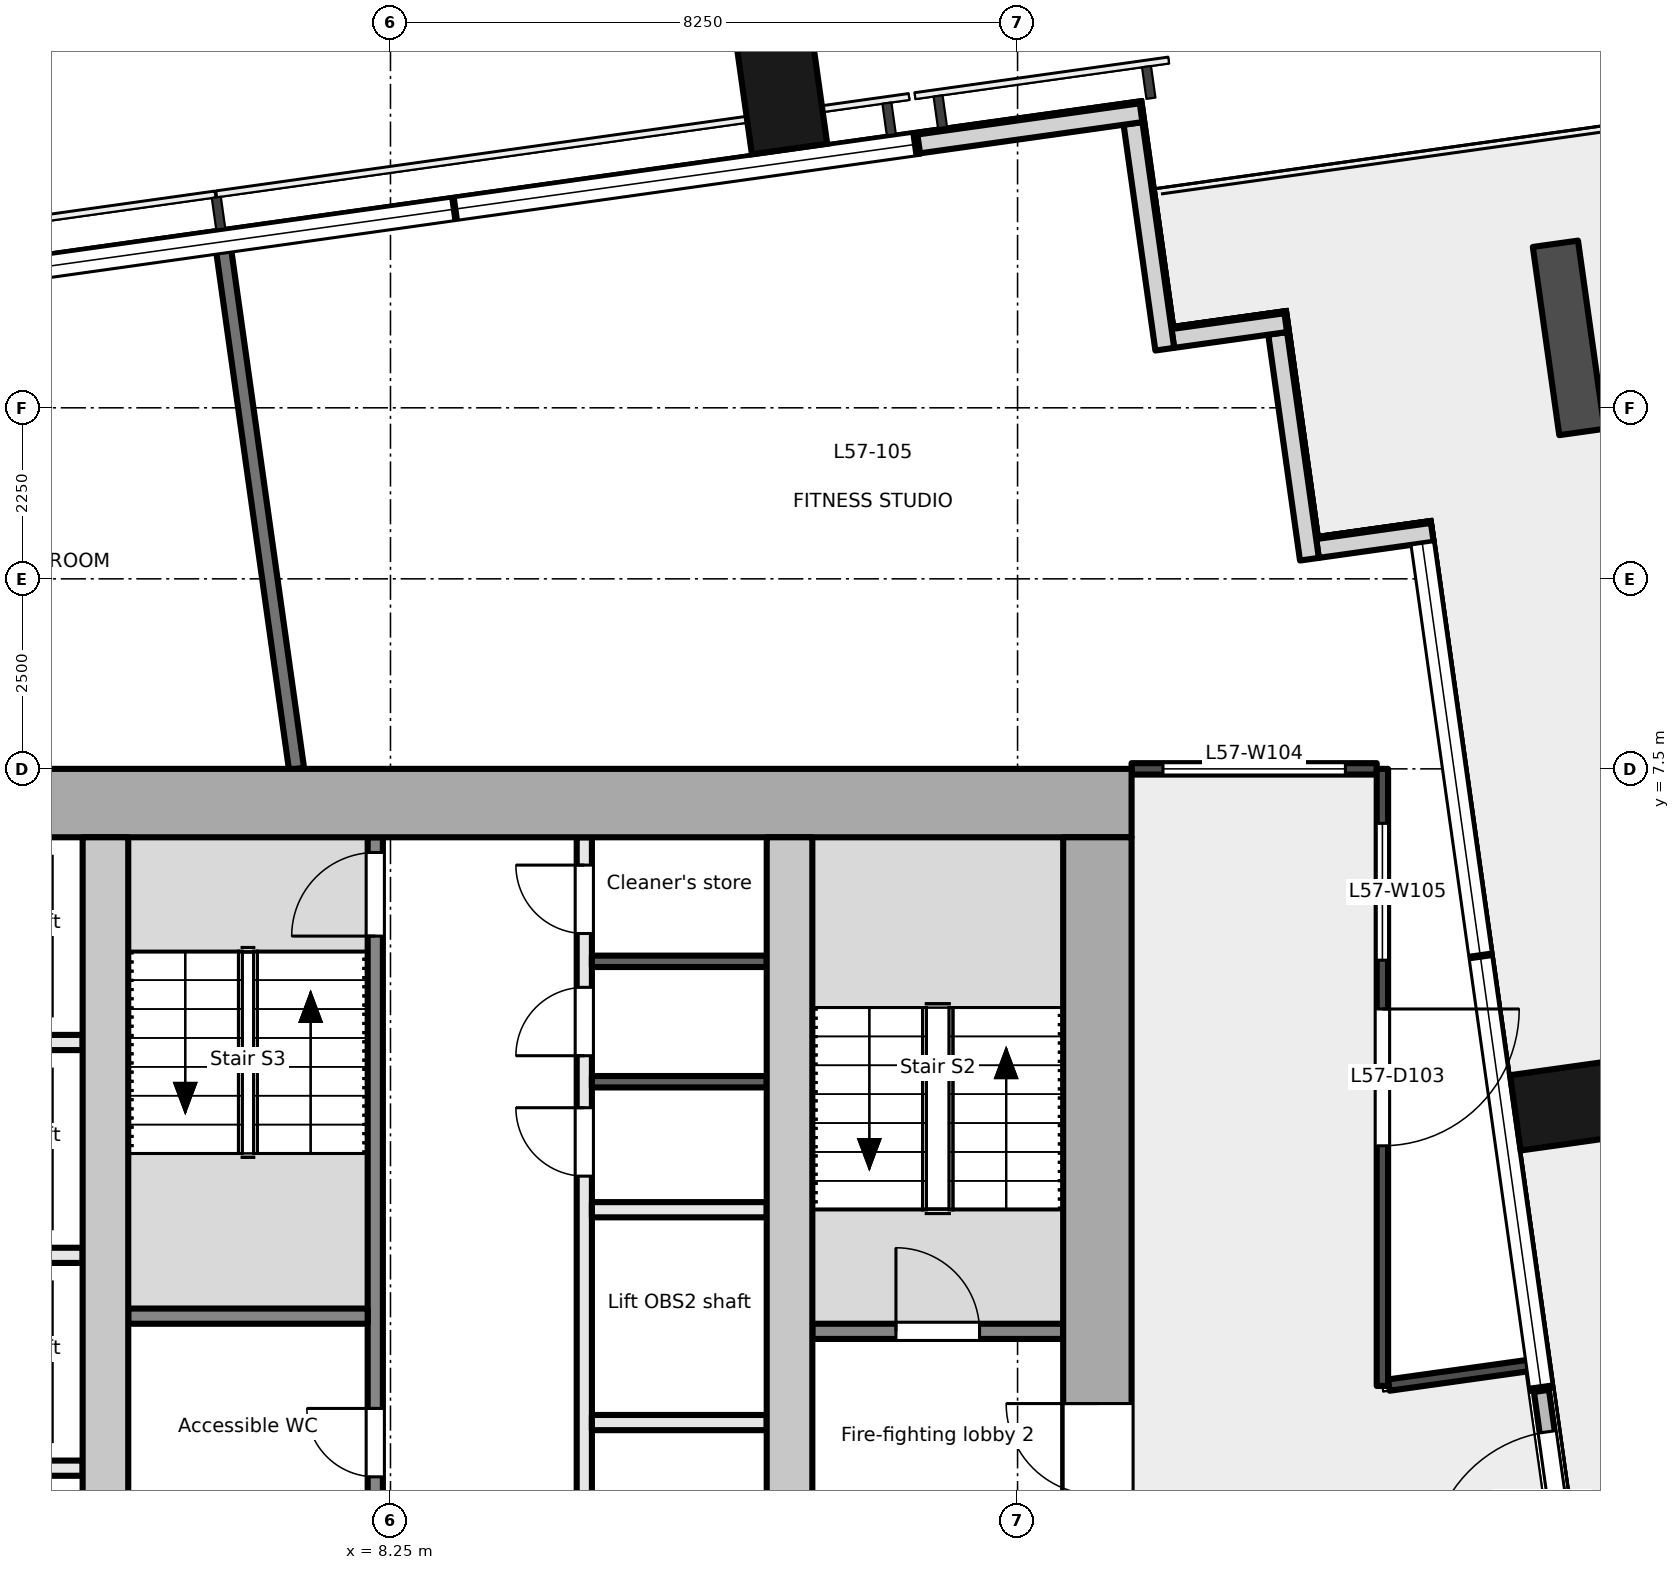
"""IFC4 building model, lengths in metres.
Left out: names, types, materials, properties, quantities, classifications, styles, units other than length and angle.
Written with IfcOpenShell. Run it as: python <this file> out.ifc"""

import sys

from ifc_helpers import new_model, si_unit, direction, frame, frame_2d, origin, origin_2d, place, context, subcontext, project, spatial, rectangle, extrude, element, fill, save


model = new_model("IFC4")
c1 = context("Model", 3, precision=1e-05, world=origin(), true_north=direction((0.0, 1.0)))
c2 = subcontext(c1, "Body", "Model", "MODEL_VIEW")
j1 = project(units=[si_unit("LENGTHUNIT", "METRE"), si_unit("PLANEANGLEUNIT", "RADIAN")], contexts=[c1])
p1 = place(None, origin())
s1 = spatial("IfcSite", under=j1, at=p1, CompositionType="ELEMENT")
p2 = place(p1, origin())
s2 = spatial("IfcBuilding", under=s1, at=p2, CompositionType="ELEMENT")
p3 = place(p2, frame((0.0, 0.0, 249.7)))
s3 = spatial("IfcBuildingStorey", under=s2, at=p3, CompositionType="ELEMENT", Elevation=249.7)
for number, where, z_axis, x_axis in (
    (1, (23.941, 3.1, -0.2), (0.0, 0.0, 1.0), (-0.139, 0.99, 0.0)),
    (2, (13.375, 16.546, -0.2), (0.0, 0.0, 1.0), (0.99, 0.139, 0.0)),
):
    element("IfcColumn", number, at=place(p3, frame(where, z_axis=z_axis, x_axis=x_axis)), inside=s3, PredefinedType="COLUMN", context=c2, shape_type="SweptSolid", body=[
        extrude(rectangle(XDim=1.0, YDim=1.8, at=origin_2d()), origin(), (0.0, 0.0, 1.0), 5.4),
    ])
p4 = place(p3, frame((23.794, -3.544, 0.0), z_axis=(0.0, 0.0, 1.0), x_axis=(-0.139184910023, 0.990266409014, 0.0)))
e3 = element("IfcWall", 3, at=p4, inside=s3, PredefinedType="SOLIDWALL", context=c2, shape_type="SweptSolid", body=[
    extrude(rectangle(XDim=2.889, YDim=0.2, at=frame_2d((1.444, 0.0))), origin(), (0.0, 0.0, 1.0), 4.1),
])
p5 = place(p4, frame((0.544, 0.0, 0.0)))
e4 = element("IfcOpeningElement", 4, at=p5, cuts=e3, PredefinedType="OPENING", context=c2, shape_type="SweptSolid", body=[
    extrude(rectangle(XDim=1.8, YDim=2.4, at=frame_2d((0.9, 1.2))), frame((0.0, 0.111, 0.0), z_axis=(0.0, -1.0, 0.0), x_axis=(1.0, 0.0, 0.0)), (0.0, 0.0, 1.0), 0.221),
])
p6 = place(p3, frame((21.956, 10.612, 0.0), z_axis=(0.0, 0.0, 1.0), x_axis=(-0.990248296447, -0.139313715703, 0.0)))
e5 = element("IfcWall", 5, at=p6, inside=s3, PredefinedType="SOLIDWALL", context=c2, shape_type="SweptSolid", body=[
    extrude(rectangle(XDim=1.525, YDim=0.25, at=frame_2d((0.762, 0.0))), origin(), (0.0, 0.0, 1.0), 5.2),
])
p7 = place(p3, frame((20.34, 10.258, 0.0), z_axis=(0.0, 0.0, 1.0), x_axis=(-0.139393225799, 0.990237107263, 0.0)))
e6 = element("IfcWall", 6, at=p7, inside=s3, PredefinedType="SOLIDWALL", context=c2, shape_type="SweptSolid", body=[
    extrude(rectangle(XDim=3.0, YDim=0.25, at=frame_2d((1.5, 0.0))), origin(), (0.0, 0.0, 1.0), 5.2),
])
p8 = place(p3, frame((20.028, 13.37, 0.0), z_axis=(0.0, 0.0, 1.0), x_axis=(-0.990330117064, -0.138730887823, 0.0)))
e7 = element("IfcWall", 7, at=p8, inside=s3, PredefinedType="SOLIDWALL", context=c2, shape_type="SweptSolid", body=[
    extrude(rectangle(XDim=1.499, YDim=0.25, at=frame_2d((0.75, 0.0))), origin(), (0.0, 0.0, 1.0), 5.2),
])
p9 = place(p3, frame((18.437, 13.021, 0.0), z_axis=(0.0, 0.0, 1.0), x_axis=(-0.139358350296, 0.990242015975, 0.0)))
e8 = element("IfcWall", 8, at=p9, inside=s3, PredefinedType="SOLIDWALL", context=c2, shape_type="SweptSolid", body=[
    extrude(rectangle(XDim=2.999, YDim=0.25, at=frame_2d((1.5, 0.0))), origin(), (0.0, 0.0, 1.0), 5.2),
])
p10 = place(p3, frame((18.125, 16.132, 0.0), z_axis=(0.0, 0.0, 1.0), x_axis=(-0.990291981483, -0.139002846771, 0.0)))
e9 = element("IfcWall", 9, at=p10, inside=s3, PredefinedType="SOLIDWALL", context=c2, shape_type="SweptSolid", body=[
    extrude(rectangle(XDim=2.954, YDim=0.25, at=frame_2d((1.477, 0.0))), origin(), (0.0, 0.0, 1.0), 5.2),
])
p11 = place(p3, frame((23.576, 14.408, 0.0), z_axis=(0.0, 0.0, 1.0), x_axis=(0.139233886918, -0.99025952393, 0.0)))
e10 = element("IfcWall", 10, at=p11, inside=s3, PredefinedType="SOLIDWALL", context=c2, shape_type="SweptSolid", body=[
    extrude(rectangle(XDim=2.5, YDim=0.6, at=frame_2d((1.25, 0.0))), origin(), (0.0, 0.0, 1.0), 0.7),
])
p12 = place(p3, frame((-18.0, 7.05, -0.2), z_axis=(0.0, 0.0, 1.0), x_axis=(1.0, 0.0, 0.0)))
e11 = element("IfcWall", 11, at=p12, inside=s3, PredefinedType="SHEAR", context=c2, shape_type="SweptSolid", body=[
    extrude(rectangle(XDim=36.0, YDim=0.9, at=frame_2d((18.0, 0.0))), origin(), (0.0, 0.0, 1.0), 5.4),
])
p13 = place(p3, frame((17.55, -6.6, -0.2), z_axis=(0.0, 0.0, 1.0), x_axis=(0.0, 1.0, 0.0)))
e12 = element("IfcWall", 12, at=p13, inside=s3, PredefinedType="SHEAR", context=c2, shape_type="SweptSolid", body=[
    extrude(rectangle(XDim=13.2, YDim=0.9, at=frame_2d((6.6, 0.0))), origin(), (0.0, 0.0, 1.0), 5.4),
])
p14 = place(p13, frame((4.55, 0.0, 0.2)))
e13 = element("IfcOpeningElement", 13, at=p14, cuts=e12, PredefinedType="OPENING", context=c2, shape_type="SweptSolid", body=[
    extrude(rectangle(XDim=1.2, YDim=2.1, at=frame_2d((0.6, 1.05))), frame((0.0, 0.46, 0.0), z_axis=(0.0, -1.0, 0.0), x_axis=(1.0, 0.0, 0.0)), (0.0, 0.0, 1.0), 0.921),
])
for number, where, z_axis, x_axis in (
    (14, (4.5, -6.6, -0.2), (0.0, 0.0, 1.0), (0.0, 1.0, 0.0)),
    (15, (13.5, -6.6, -0.2), (0.0, 0.0, 1.0), (0.0, 1.0, 0.0)),
):
    element("IfcWall", number, at=place(p3, frame(where, z_axis=z_axis, x_axis=x_axis)), inside=s3, PredefinedType="SHEAR", context=c2, shape_type="SweptSolid", body=[
        extrude(rectangle(XDim=13.2, YDim=0.6, at=frame_2d((6.6, 0.0))), origin(), (0.0, 0.0, 1.0), 5.4),
    ])
p15 = place(p3, frame((13.8, 0.1, 0.0), z_axis=(0.0, 0.0, 1.0), x_axis=(1.0, 0.0, 0.0)))
e16 = element("IfcWall", 16, at=p15, inside=s3, PredefinedType="PARTITIONING", context=c2, shape_type="SweptSolid", body=[
    extrude(rectangle(XDim=3.3, YDim=0.2, at=frame_2d((1.65, 0.0))), origin(), (0.0, 0.0, 1.0), 5.2),
])
p16 = place(p15, frame((1.1, 0.0, 0.0)))
e17 = element("IfcOpeningElement", 17, at=p16, cuts=e16, PredefinedType="OPENING", context=c2, shape_type="SweptSolid", body=[
    extrude(rectangle(XDim=1.1, YDim=2.1, at=frame_2d((0.55, 1.05))), frame((0.0, 0.111, 0.0), z_axis=(0.0, -1.0, 0.0), x_axis=(1.0, 0.0, 0.0)), (0.0, 0.0, 1.0), 0.221),
])
for number, where, z_axis, x_axis in (
    (18, (1.9, -1.7, 0.0), (0.0, 0.0, 1.0), (1.0, 0.0, 0.0)),
    (19, (1.9, 1.1, 0.0), (0.0, 0.0, 1.0), (1.0, 0.0, 0.0)),
    (20, (1.9, 3.9, 0.0), (0.0, 0.0, 1.0), (1.0, 0.0, 0.0)),
):
    element("IfcWall", number, at=place(p3, frame(where, z_axis=z_axis, x_axis=x_axis)), inside=s3, PredefinedType="PARTITIONING", context=c2, shape_type="SweptSolid", body=[
        extrude(rectangle(XDim=2.3, YDim=0.2, at=frame_2d((1.15, 0.0))), origin(), (0.0, 0.0, 1.0), 5.2),
    ])
p17 = place(p3, frame((8.05, -6.6, 0.0), z_axis=(0.0, 0.0, 1.0), x_axis=(0.0, 1.0, 0.0)))
e21 = element("IfcWall", 21, at=p17, inside=s3, PredefinedType="PARTITIONING", context=c2, shape_type="SweptSolid", body=[
    extrude(rectangle(XDim=13.2, YDim=0.2, at=frame_2d((6.6, 0.0))), origin(), (0.0, 0.0, 1.0), 5.2),
])
p18 = place(p17, frame((1.386, 0.0, 0.0)))
e22 = element("IfcOpeningElement", 22, at=p18, cuts=e21, PredefinedType="OPENING", context=c2, shape_type="SweptSolid", body=[
    extrude(rectangle(XDim=0.9, YDim=2.1, at=frame_2d((0.45, 1.05))), frame((0.0, 0.111, 0.0), z_axis=(0.0, -1.0, 0.0), x_axis=(1.0, 0.0, 0.0)), (0.0, 0.0, 1.0), 0.221),
])
p19 = place(p17, frame((4.786, 0.0, 0.0)))
e23 = element("IfcOpeningElement", 23, at=p19, cuts=e21, PredefinedType="OPENING", context=c2, shape_type="SweptSolid", body=[
    extrude(rectangle(XDim=0.9, YDim=2.1, at=frame_2d((0.45, 1.05))), frame((0.0, 0.111, 0.0), z_axis=(0.0, -1.0, 0.0), x_axis=(1.0, 0.0, 0.0)), (0.0, 0.0, 1.0), 0.221),
])
p20 = place(p17, frame((11.9, 0.0, 0.0)))
e24 = element("IfcOpeningElement", 24, at=p20, cuts=e21, PredefinedType="OPENING", context=c2, shape_type="SweptSolid", body=[
    extrude(rectangle(XDim=1.1, YDim=2.1, at=frame_2d((0.55, 1.05))), frame((0.0, 0.111, 0.0), z_axis=(0.0, -1.0, 0.0), x_axis=(1.0, 0.0, 0.0)), (0.0, 0.0, 1.0), 0.221),
])
p21 = place(p3, frame((10.8, -6.6, 0.0), z_axis=(0.0, 0.0, 1.0), x_axis=(0.0, 1.0, 0.0)))
e25 = element("IfcWall", 25, at=p21, inside=s3, PredefinedType="PARTITIONING", context=c2, shape_type="SweptSolid", body=[
    extrude(rectangle(XDim=13.2, YDim=0.2, at=frame_2d((6.6, 0.0))), origin(), (0.0, 0.0, 1.0), 5.2),
])
p22 = place(p21, frame((0.7, 0.0, 0.0)))
e26 = element("IfcOpeningElement", 26, at=p22, cuts=e25, PredefinedType="OPENING", context=c2, shape_type="SweptSolid", body=[
    extrude(rectangle(XDim=1.2, YDim=2.1, at=frame_2d((0.6, 1.05))), frame((0.0, 0.111, 0.0), z_axis=(0.0, -1.0, 0.0), x_axis=(1.0, 0.0, 0.0)), (0.0, 0.0, 1.0), 0.221),
])
p23 = place(p21, frame((8.742, 0.0, 0.0)))
e27 = element("IfcOpeningElement", 27, at=p23, cuts=e25, PredefinedType="OPENING", context=c2, shape_type="SweptSolid", body=[
    extrude(rectangle(XDim=0.9, YDim=2.1, at=frame_2d((0.45, 1.05))), frame((0.0, 0.111, 0.0), z_axis=(0.0, -1.0, 0.0), x_axis=(1.0, 0.0, 0.0)), (0.0, 0.0, 1.0), 0.221),
])
p24 = place(p21, frame((10.326, 0.0, 0.0)))
e28 = element("IfcOpeningElement", 28, at=p24, cuts=e25, PredefinedType="OPENING", context=c2, shape_type="SweptSolid", body=[
    extrude(rectangle(XDim=0.9, YDim=2.1, at=frame_2d((0.45, 1.05))), frame((0.0, 0.111, 0.0), z_axis=(0.0, -1.0, 0.0), x_axis=(1.0, 0.0, 0.0)), (0.0, 0.0, 1.0), 0.221),
])
p25 = place(p21, frame((11.934, 0.0, 0.0)))
e29 = element("IfcOpeningElement", 29, at=p25, cuts=e25, PredefinedType="OPENING", context=c2, shape_type="SweptSolid", body=[
    extrude(rectangle(XDim=0.9, YDim=2.1, at=frame_2d((0.45, 1.05))), frame((0.0, 0.111, 0.0), z_axis=(0.0, -1.0, 0.0), x_axis=(1.0, 0.0, 0.0)), (0.0, 0.0, 1.0), 0.221),
])
p26 = place(p3, frame((4.8, 0.3, 0.0), z_axis=(0.0, 0.0, 1.0), x_axis=(1.0, 0.0, 0.0)))
e30 = element("IfcWall", 30, at=p26, inside=s3, PredefinedType="PARTITIONING", context=c2, shape_type="SweptSolid", body=[
    extrude(rectangle(XDim=3.15, YDim=0.2, at=frame_2d((1.575, 0.0))), origin(), (0.0, 0.0, 1.0), 5.2),
])
for number, where, z_axis, x_axis in (
    (31, (10.9, -1.1, 0.0), (0.0, 0.0, 1.0), (1.0, 0.0, 0.0)),
    (32, (10.9, 1.7, 0.0), (0.0, 0.0, 1.0), (1.0, 0.0, 0.0)),
):
    element("IfcWall", number, at=place(p3, frame(where, z_axis=z_axis, x_axis=x_axis)), inside=s3, PredefinedType="PARTITIONING", context=c2, shape_type="SweptSolid", body=[
        extrude(rectangle(XDim=2.3, YDim=0.2, at=frame_2d((1.15, 0.0))), origin(), (0.0, 0.0, 1.0), 5.2),
    ])
for number, where, z_axis, x_axis in (
    (33, (10.9, 3.384, 0.0), (0.0, 0.0, 1.0), (1.0, 0.0, 0.0)),
    (34, (10.9, 4.968, 0.0), (0.0, 0.0, 1.0), (1.0, 0.0, 0.0)),
):
    element("IfcWall", number, at=place(p3, frame(where, z_axis=z_axis, x_axis=x_axis)), inside=s3, PredefinedType="PARTITIONING", context=c2, shape_type="SweptSolid", body=[
        extrude(rectangle(XDim=2.3, YDim=0.15, at=frame_2d((1.15, 0.0))), origin(), (0.0, 0.0, 1.0), 5.2),
    ])
p27 = place(p3, frame((18.0, 7.5, 0.0), z_axis=(0.0, 0.0, 1.0), x_axis=(1.0, 0.0, 0.0)))
e35 = element("IfcWall", 35, at=p27, inside=s3, PredefinedType="PARTITIONING", context=c2, shape_type="SweptSolid", body=[
    extrude(rectangle(XDim=3.225, YDim=0.15, at=frame_2d((1.613, 0.0))), origin(), (0.0, 0.0, 1.0), 5.2),
])
p28 = place(p27, frame((0.413, 0.0, 0.0)))
e36 = element("IfcOpeningElement", 36, at=p28, cuts=e35, PredefinedType="OPENING", context=c2, shape_type="SweptSolid", body=[
    extrude(rectangle(XDim=2.4, YDim=2.4, at=frame_2d((1.2, 1.2))), frame((0.0, 0.085, 0.0), z_axis=(0.0, -1.0, 0.0), x_axis=(1.0, 0.0, 0.0)), (0.0, 0.0, 1.0), 0.171),
])
p29 = place(p3, frame((21.3, 7.5, 0.0), z_axis=(0.0, 0.0, 1.0), x_axis=(0.0, -1.0, 0.0)))
e37 = element("IfcWall", 37, at=p29, inside=s3, PredefinedType="PARTITIONING", context=c2, shape_type="SweptSolid", body=[
    extrude(rectangle(XDim=8.118, YDim=0.15, at=frame_2d((4.059, 0.0))), origin(), (0.0, 0.0, 1.0), 4.9),
])
p30 = place(p29, frame((3.159, 0.0, 0.0)))
e38 = element("IfcOpeningElement", 38, at=p30, cuts=e37, PredefinedType="OPENING", context=c2, shape_type="SweptSolid", body=[
    extrude(rectangle(XDim=1.8, YDim=2.1, at=frame_2d((0.9, 1.05))), frame((0.0, 0.085, 0.0), z_axis=(0.0, -1.0, 0.0), x_axis=(1.0, 0.0, 0.0)), (0.0, 0.0, 1.0), 0.171),
])
p31 = place(p29, frame((0.717, 0.0, 0.0)))
e39 = element("IfcOpeningElement", 39, at=p31, cuts=e37, PredefinedType="OPENING", context=c2, shape_type="SweptSolid", body=[
    extrude(rectangle(XDim=1.8, YDim=2.4, at=frame_2d((0.9, 1.2))), frame((0.0, 0.085, 0.0), z_axis=(0.0, -1.0, 0.0), x_axis=(1.0, 0.0, 0.0)), (0.0, 0.0, 1.0), 0.171),
])
p32 = place(p3, frame((21.385, -0.607, 0.0), z_axis=(0.0, 0.0, 1.0), x_axis=(0.990318640418, 0.138812789179, 0.0)))
e40 = element("IfcWall", 40, at=p32, inside=s3, PredefinedType="PARTITIONING", context=c2, shape_type="SweptSolid", body=[
    extrude(rectangle(XDim=1.887, YDim=0.15, at=frame_2d((0.944, 0.0))), origin(), (0.0, 0.0, 1.0), 5.2),
])
p33 = place(p3, frame((7.014, 7.5, 0.0), z_axis=(0.0, 0.0, 1.0), x_axis=(-0.139161207558, 0.990269740177, 0.0)))
e41 = element("IfcWall", 41, at=p33, inside=s3, PredefinedType="PARTITIONING", context=c2, shape_type="SweptSolid", body=[
    extrude(rectangle(XDim=6.912, YDim=0.2, at=frame_2d((3.456, 0.0))), origin(), (0.0, 0.0, 1.0), 5.2),
])
p34 = place(p5, origin())
e42 = element("IfcDoor", 42, at=p34, inside=s3, OperationType="DOUBLE_DOOR_SINGLE_SWING", PredefinedType="DOOR", context=c2, shape_type="SweptSolid", body=[
    extrude(rectangle(XDim=1.8, YDim=2.4, at=frame_2d((0.9, 1.2))), frame((0.0, 0.025, 0.0), z_axis=(0.0, -1.0, 0.0), x_axis=(1.0, 0.0, 0.0)), (0.0, 0.0, 1.0), 0.05),
])
fill(e4, e42)
p35 = place(p14, origin())
e43 = element("IfcDoor", 43, at=p35, inside=s3, OperationType="SINGLE_SWING_RIGHT", PredefinedType="DOOR", context=c2, shape_type="SweptSolid", body=[
    extrude(rectangle(XDim=1.2, YDim=2.1, at=frame_2d((0.6, 1.05))), frame((0.0, 0.025, 0.0), z_axis=(0.0, -1.0, 0.0), x_axis=(1.0, 0.0, 0.0)), (0.0, 0.0, 1.0), 0.05),
])
fill(e13, e43)
p36 = place(p16, origin())
e44 = element("IfcDoor", 44, at=p36, inside=s3, OperationType="SINGLE_SWING_LEFT", PredefinedType="DOOR", context=c2, shape_type="SweptSolid", body=[
    extrude(rectangle(XDim=1.1, YDim=2.1, at=frame_2d((0.55, 1.05))), frame((0.0, 0.025, 0.0), z_axis=(0.0, -1.0, 0.0), x_axis=(1.0, 0.0, 0.0)), (0.0, 0.0, 1.0), 0.05),
])
fill(e17, e44)
p37 = place(p19, origin())
e45 = element("IfcDoor", 45, at=p37, inside=s3, OperationType="SINGLE_SWING_RIGHT", PredefinedType="DOOR", context=c2, shape_type="SweptSolid", body=[
    extrude(rectangle(XDim=0.9, YDim=2.1, at=frame_2d((0.45, 1.05))), frame((0.0, 0.025, 0.0), z_axis=(0.0, -1.0, 0.0), x_axis=(1.0, 0.0, 0.0)), (0.0, 0.0, 1.0), 0.05),
])
fill(e23, e45)
p38 = place(p20, origin())
e46 = element("IfcDoor", 46, at=p38, inside=s3, OperationType="SINGLE_SWING_LEFT", PredefinedType="DOOR", context=c2, shape_type="SweptSolid", body=[
    extrude(rectangle(XDim=1.1, YDim=2.1, at=frame_2d((0.55, 1.05))), frame((0.0, 0.025, 0.0), z_axis=(0.0, -1.0, 0.0), x_axis=(1.0, 0.0, 0.0)), (0.0, 0.0, 1.0), 0.05),
])
fill(e24, e46)
p39 = place(p23, origin())
e47 = element("IfcDoor", 47, at=p39, inside=s3, OperationType="SINGLE_SWING_RIGHT", PredefinedType="DOOR", context=c2, shape_type="SweptSolid", body=[
    extrude(rectangle(XDim=0.9, YDim=2.1, at=frame_2d((0.45, 1.05))), frame((0.0, 0.025, 0.0), z_axis=(0.0, -1.0, 0.0), x_axis=(1.0, 0.0, 0.0)), (0.0, 0.0, 1.0), 0.05),
])
fill(e27, e47)
p40 = place(p24, origin())
e48 = element("IfcDoor", 48, at=p40, inside=s3, OperationType="SINGLE_SWING_LEFT", PredefinedType="DOOR", context=c2, shape_type="SweptSolid", body=[
    extrude(rectangle(XDim=0.9, YDim=2.1, at=frame_2d((0.45, 1.05))), frame((0.0, 0.025, 0.0), z_axis=(0.0, -1.0, 0.0), x_axis=(1.0, 0.0, 0.0)), (0.0, 0.0, 1.0), 0.05),
])
fill(e28, e48)
p41 = place(p25, origin())
e49 = element("IfcDoor", 49, at=p41, inside=s3, OperationType="SINGLE_SWING_RIGHT", PredefinedType="DOOR", context=c2, shape_type="SweptSolid", body=[
    extrude(rectangle(XDim=0.9, YDim=2.1, at=frame_2d((0.45, 1.05))), frame((0.0, 0.025, 0.0), z_axis=(0.0, -1.0, 0.0), x_axis=(1.0, 0.0, 0.0)), (0.0, 0.0, 1.0), 0.05),
])
fill(e29, e49)
p42 = place(p30, origin())
e50 = element("IfcDoor", 50, at=p42, inside=s3, OperationType="DOUBLE_DOOR_SINGLE_SWING", PredefinedType="DOOR", context=c2, shape_type="SweptSolid", body=[
    extrude(rectangle(XDim=1.8, YDim=2.1, at=frame_2d((0.9, 1.05))), frame((0.0, 0.025, 0.0), z_axis=(0.0, -1.0, 0.0), x_axis=(1.0, 0.0, 0.0)), (0.0, 0.0, 1.0), 0.05),
])
fill(e38, e50)
p43 = place(p28, origin())
e51 = element("IfcWindow", 51, at=p43, inside=s3, PartitioningType="SINGLE_PANEL", PredefinedType="WINDOW", context=c2, shape_type="SweptSolid", body=[
    extrude(rectangle(XDim=2.4, YDim=2.4, at=frame_2d((1.2, 1.2))), frame((0.0, 0.03, 0.0), z_axis=(0.0, -1.0, 0.0), x_axis=(1.0, 0.0, 0.0)), (0.0, 0.0, 1.0), 0.06),
])
fill(e36, e51)
p44 = place(p31, origin())
e52 = element("IfcWindow", 52, at=p44, inside=s3, PartitioningType="SINGLE_PANEL", PredefinedType="WINDOW", context=c2, shape_type="SweptSolid", body=[
    extrude(rectangle(XDim=1.8, YDim=2.4, at=frame_2d((0.9, 1.2))), frame((0.0, 0.03, 0.0), z_axis=(0.0, -1.0, 0.0), x_axis=(1.0, 0.0, 0.0)), (0.0, 0.0, 1.0), 0.06),
])
fill(e39, e52)
save(model, sys.argv[1])
